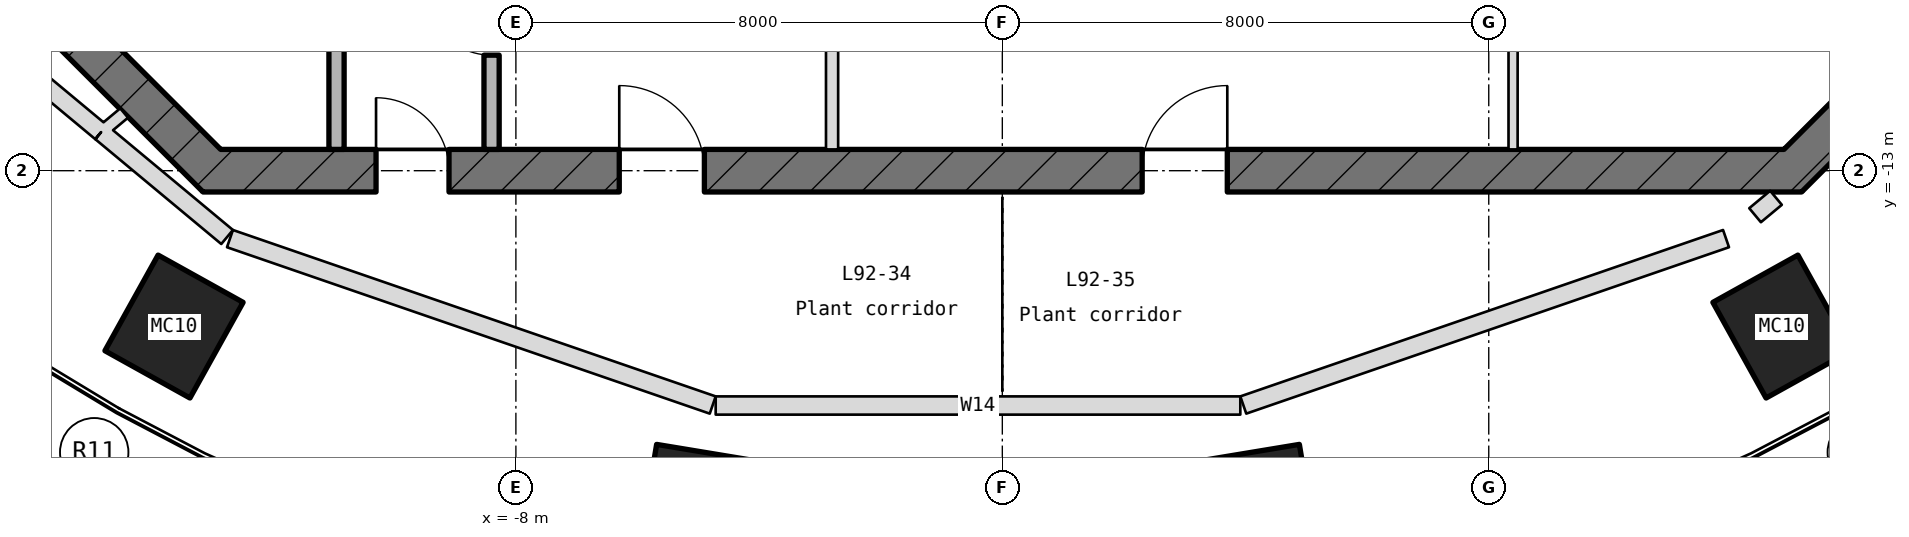
"""IFC4 building model, lengths in metres.
Left out: names, types, materials, properties, quantities, classifications, styles, units other than length and angle.
Written with IfcOpenShell. Run it as: python <this file> out.ifc"""

import sys

from ifc_helpers import new_model, si_unit, direction, frame, frame_2d, origin, place, context, subcontext, project, spatial, polyline, rectangle, outline, extrude, element, fill, save


model = new_model("IFC4")
c1 = context("Model", 3, precision=1e-05, world=origin(), true_north=direction((0.0, 1.0)))
c2 = subcontext(c1, "Body", "Model", "MODEL_VIEW")
j1 = project(units=[si_unit("LENGTHUNIT", "METRE"), si_unit("PLANEANGLEUNIT", "RADIAN")], contexts=[c1])
p1 = place(None, origin())
s1 = spatial("IfcSite", under=j1, at=p1, CompositionType="ELEMENT")
p2 = place(p1, origin())
s2 = spatial("IfcBuilding", under=s1, at=p2, CompositionType="ELEMENT")
p3 = place(p2, frame((0.0, 0.0, 407.55)))
s3 = spatial("IfcBuildingStorey", under=s2, at=p3, CompositionType="ELEMENT", Elevation=407.55)
p4 = place(p3, frame((0.0, 0.0, -0.3)))
e1 = element("IfcColumn", 1, at=p4, inside=s3, PredefinedType="COLUMN", context=c2, shape_type="SweptSolid", body=[
    extrude(outline(polyline([(-13.361, -16.738), (-14.759, -15.961), (-13.885, -14.388), (-13.639, -14.084), (-12.24, -14.862), (-13.115, -16.435), (-13.361, -16.738)])), origin(), (0.0, 0.0, 1.0), 6.1),
])
p5 = place(p3, frame((0.0, 0.0, -0.3)))
e2 = element("IfcColumn", 2, at=p5, inside=s3, PredefinedType="COLUMN", context=c2, shape_type="SweptSolid", body=[
    extrude(outline(polyline([(-4.401, -19.538), (-5.979, -19.277), (-5.685, -17.501), (-5.599, -17.143), (-4.021, -17.404), (-4.315, -19.18), (-4.401, -19.538)])), origin(), (0.0, 0.0, 1.0), 6.1),
])
p6 = place(p3, frame((0.0, 0.0, -0.3)))
e3 = element("IfcColumn", 3, at=p6, inside=s3, PredefinedType="COLUMN", context=c2, shape_type="SweptSolid", body=[
    extrude(outline(polyline([(3.601, -19.538), (3.515, -19.18), (3.221, -17.404), (4.799, -17.143), (4.885, -17.501), (5.179, -19.277), (3.601, -19.538)])), origin(), (0.0, 0.0, 1.0), 6.1),
])
p7 = place(p3, frame((0.0, 0.0, -0.3)))
e4 = element("IfcColumn", 4, at=p7, inside=s3, PredefinedType="COLUMN", context=c2, shape_type="SweptSolid", body=[
    extrude(outline(polyline([(12.561, -16.738), (12.315, -16.435), (11.44, -14.862), (12.839, -14.084), (13.085, -14.388), (13.959, -15.961), (12.561, -16.738)])), origin(), (0.0, 0.0, 1.0), 6.1),
])
for number, where, z_axis, x_axis in (
    (5, (12.897, -13.103, -0.3), (0.0, 0.0, 1.0), (0.707, 0.707, 0.0)),
    (6, (-16.103, -9.897, -0.3), (0.0, 0.0, 1.0), (0.707, -0.707, 0.0)),
):
    element("IfcWall", number, at=place(p3, frame(where, z_axis=z_axis, x_axis=x_axis)), inside=s3, PredefinedType="SHEAR", context=c2, shape_type="SweptSolid", body=[
        extrude(rectangle(XDim=4.533, YDim=0.7, at=frame_2d((2.266, 0.0))), origin(), (0.0, 0.0, 1.0), 6.1),
    ])
p8 = place(p3, frame((-13.145, -13.0, -0.3), z_axis=(0.0, 0.0, 1.0), x_axis=(1.0, 0.0, 0.0)))
e7 = element("IfcWall", 7, at=p8, inside=s3, PredefinedType="SHEAR", context=c2, shape_type="SweptSolid", body=[
    extrude(rectangle(XDim=26.29, YDim=0.7, at=frame_2d((13.145, 0.0))), origin(), (0.0, 0.0, 1.0), 6.1),
])
p9 = place(p8, frame((2.845, 0.0, 0.3)))
e8 = element("IfcOpeningElement", 8, at=p9, cuts=e7, PredefinedType="OPENING", context=c2, shape_type="SweptSolid", body=[
    extrude(rectangle(XDim=1.2, YDim=2.1, at=frame_2d((0.6, 1.05))), frame((0.0, 0.36, 0.0), z_axis=(0.0, -1.0, 0.0), x_axis=(1.0, 0.0, 0.0)), (0.0, 0.0, 1.0), 0.72),
])
p10 = place(p8, frame((6.845, 0.0, 0.3)))
e9 = element("IfcOpeningElement", 9, at=p10, cuts=e7, PredefinedType="OPENING", context=c2, shape_type="SweptSolid", body=[
    extrude(rectangle(XDim=1.4, YDim=2.1, at=frame_2d((0.7, 1.05))), frame((0.0, 0.36, 0.0), z_axis=(0.0, -1.0, 0.0), x_axis=(1.0, 0.0, 0.0)), (0.0, 0.0, 1.0), 0.72),
])
p11 = place(p8, frame((15.445, 0.0, 0.3)))
e10 = element("IfcOpeningElement", 10, at=p11, cuts=e7, PredefinedType="OPENING", context=c2, shape_type="SweptSolid", body=[
    extrude(rectangle(XDim=1.4, YDim=2.1, at=frame_2d((0.7, 1.05))), frame((0.0, 0.36, 0.0), z_axis=(0.0, -1.0, 0.0), x_axis=(1.0, 0.0, 0.0)), (0.0, 0.0, 1.0), 0.72),
])
p12 = place(p3, frame((-10.95, -12.65, 0.0), z_axis=(0.0, 0.0, 1.0), x_axis=(0.0, 1.0, 0.0)))
e11 = element("IfcWall", 11, at=p12, inside=s3, PredefinedType="STANDARD", context=c2, shape_type="SweptSolid", body=[
    extrude(rectangle(XDim=3.775, YDim=0.25, at=frame_2d((1.887, 0.0))), origin(), (0.0, 0.0, 1.0), 5.8),
])
p13 = place(p3, frame((-8.4, -12.65, 0.0), z_axis=(0.0, 0.0, 1.0), x_axis=(0.0, 1.0, 0.0)))
e12 = element("IfcWall", 12, at=p13, inside=s3, PredefinedType="STANDARD", context=c2, shape_type="SweptSolid", body=[
    extrude(rectangle(XDim=3.9, YDim=0.25, at=frame_2d((1.95, 0.0))), origin(), (0.0, 0.0, 1.0), 5.8),
])
p14 = place(p13, frame((1.55, 0.0, 0.0)))
e13 = element("IfcOpeningElement", 13, at=p14, cuts=e12, PredefinedType="OPENING", context=c2, shape_type="SweptSolid", body=[
    extrude(rectangle(XDim=1.1, YDim=2.1, at=frame_2d((0.55, 1.05))), frame((0.0, 0.135, 0.0), z_axis=(0.0, -1.0, 0.0), x_axis=(1.0, 0.0, 0.0)), (0.0, 0.0, 1.0), 0.27),
])
p15 = place(p3, frame((-2.8, -12.65, 0.0), z_axis=(0.0, 0.0, 1.0), x_axis=(0.0, 1.0, 0.0)))
e14 = element("IfcWall", 14, at=p15, inside=s3, PredefinedType="PARTITIONING", context=c2, shape_type="SweptSolid", body=[
    extrude(rectangle(XDim=4.19, YDim=0.2, at=frame_2d((2.095, 0.0))), origin(), (0.0, 0.0, 1.0), 5.8),
])
p16 = place(p3, frame((8.4, -12.65, 0.0), z_axis=(0.0, 0.0, 1.0), x_axis=(0.0, 1.0, 0.0)))
e15 = element("IfcWall", 15, at=p16, inside=s3, PredefinedType="PARTITIONING", context=c2, shape_type="SweptSolid", body=[
    extrude(rectangle(XDim=4.3, YDim=0.15, at=frame_2d((2.15, 0.0))), origin(), (0.0, 0.0, 1.0), 5.8),
])
p17 = place(p3, frame((-14.823, -12.365, 0.0), z_axis=(0.0, 0.0, 1.0), x_axis=(-0.76873574398, 0.63956653753, 0.0)))
e16 = element("IfcWall", 16, at=p17, inside=s3, PredefinedType="STANDARD", context=c2, shape_type="SweptSolid", body=[
    extrude(rectangle(XDim=3.888, YDim=0.3, at=frame_2d((1.944, 0.0))), origin(), (0.0, 0.0, 1.0), 5.8),
])
p18 = place(p3, frame((-4.714, -16.862, 0.0), z_axis=(0.0, 0.0, 1.0), x_axis=(1.0, 0.0, 0.0)))
e17 = element("IfcWall", 17, at=p18, inside=s3, PredefinedType="STANDARD", context=c2, shape_type="SweptSolid", body=[
    extrude(rectangle(XDim=8.628, YDim=0.3, at=frame_2d((4.314, 0.0))), origin(), (0.0, 0.0, 1.0), 5.8),
])
p19 = place(p3, frame((3.963, -16.854, 0.0), z_axis=(0.0, 0.0, 1.0), x_axis=(0.945415916935, 0.325866144309, 0.0)))
e18 = element("IfcWall", 18, at=p19, inside=s3, PredefinedType="STANDARD", context=c2, shape_type="SweptSolid", body=[
    extrude(rectangle(XDim=8.398, YDim=0.3, at=frame_2d((4.199, 0.0))), origin(), (0.0, 0.0, 1.0), 5.8),
])
p20 = place(p3, frame((12.38, -13.732, 0.0), z_axis=(0.0, 0.0, 1.0), x_axis=(0.768489258739, 0.639862687772, 0.0)))
e19 = element("IfcWall", 19, at=p20, inside=s3, PredefinedType="STANDARD", context=c2, shape_type="SweptSolid", body=[
    extrude(rectangle(XDim=0.448, YDim=0.3, at=frame_2d((0.224, 0.0))), origin(), (0.0, 0.0, 1.0), 5.8),
])
p21 = place(p3, frame((-12.75, -14.09, 0.0), z_axis=(0.0, 0.0, 1.0), x_axis=(-0.768703742764, 0.639604999872, 0.0)))
e20 = element("IfcWall", 20, at=p21, inside=s3, PredefinedType="STANDARD", context=c2, shape_type="SweptSolid", body=[
    extrude(rectangle(XDim=2.695, YDim=0.3, at=frame_2d((1.347, 0.0))), origin(), (0.0, 0.0, 1.0), 5.8),
])
p22 = place(p3, frame((-4.763, -16.854, 0.0), z_axis=(0.0, 0.0, 1.0), x_axis=(-0.945415916935, 0.325866144309, 0.0)))
e21 = element("IfcWall", 21, at=p22, inside=s3, PredefinedType="STANDARD", context=c2, shape_type="SweptSolid", body=[
    extrude(rectangle(XDim=8.398, YDim=0.3, at=frame_2d((4.199, 0.0))), origin(), (0.0, 0.0, 1.0), 5.8),
])
p23 = place(p3, frame((-14.821, -12.367, 0.0), z_axis=(0.0, 0.0, 1.0), x_axis=(0.767773609771, 0.640721221858, 0.0)))
e22 = element("IfcWall", 22, at=p23, inside=s3, PredefinedType="PARTITIONING", context=c2, shape_type="SweptSolid", body=[
    extrude(rectangle(XDim=0.492, YDim=0.2, at=frame_2d((0.246, 0.0))), origin(), (0.0, 0.0, 1.0), 5.8),
])
p24 = place(p14, origin())
e23 = element("IfcDoor", 23, at=p24, inside=s3, OperationType="SINGLE_SWING_RIGHT", PredefinedType="DOOR", context=c2, shape_type="SweptSolid", body=[
    extrude(rectangle(XDim=1.1, YDim=2.1, at=frame_2d((0.55, 1.05))), frame((0.0, 0.025, 0.0), z_axis=(0.0, -1.0, 0.0), x_axis=(1.0, 0.0, 0.0)), (0.0, 0.0, 1.0), 0.05),
])
fill(e13, e23)
p25 = place(p9, origin())
e24 = element("IfcDoor", 24, at=p25, inside=s3, OperationType="SINGLE_SWING_RIGHT", PredefinedType="DOOR", context=c2, shape_type="SweptSolid", body=[
    extrude(rectangle(XDim=1.2, YDim=2.1, at=frame_2d((0.6, 1.05))), frame((0.0, 0.025, 0.0), z_axis=(0.0, -1.0, 0.0), x_axis=(1.0, 0.0, 0.0)), (0.0, 0.0, 1.0), 0.05),
])
fill(e8, e24)
p26 = place(p10, origin())
e25 = element("IfcDoor", 25, at=p26, inside=s3, OperationType="SINGLE_SWING_RIGHT", PredefinedType="DOOR", context=c2, shape_type="SweptSolid", body=[
    extrude(rectangle(XDim=1.4, YDim=2.1, at=frame_2d((0.7, 1.05))), frame((0.0, 0.025, 0.0), z_axis=(0.0, -1.0, 0.0), x_axis=(1.0, 0.0, 0.0)), (0.0, 0.0, 1.0), 0.05),
])
fill(e9, e25)
p27 = place(p11, origin())
e26 = element("IfcDoor", 26, at=p27, inside=s3, OperationType="SINGLE_SWING_RIGHT", PredefinedType="DOOR", context=c2, shape_type="SweptSolid", body=[
    extrude(rectangle(XDim=1.4, YDim=2.1, at=frame_2d((0.7, 1.05))), frame((0.0, 0.025, 0.0), z_axis=(0.0, -1.0, 0.0), x_axis=(1.0, 0.0, 0.0)), (0.0, 0.0, 1.0), 0.05),
])
fill(e10, e26)
save(model, sys.argv[1])
